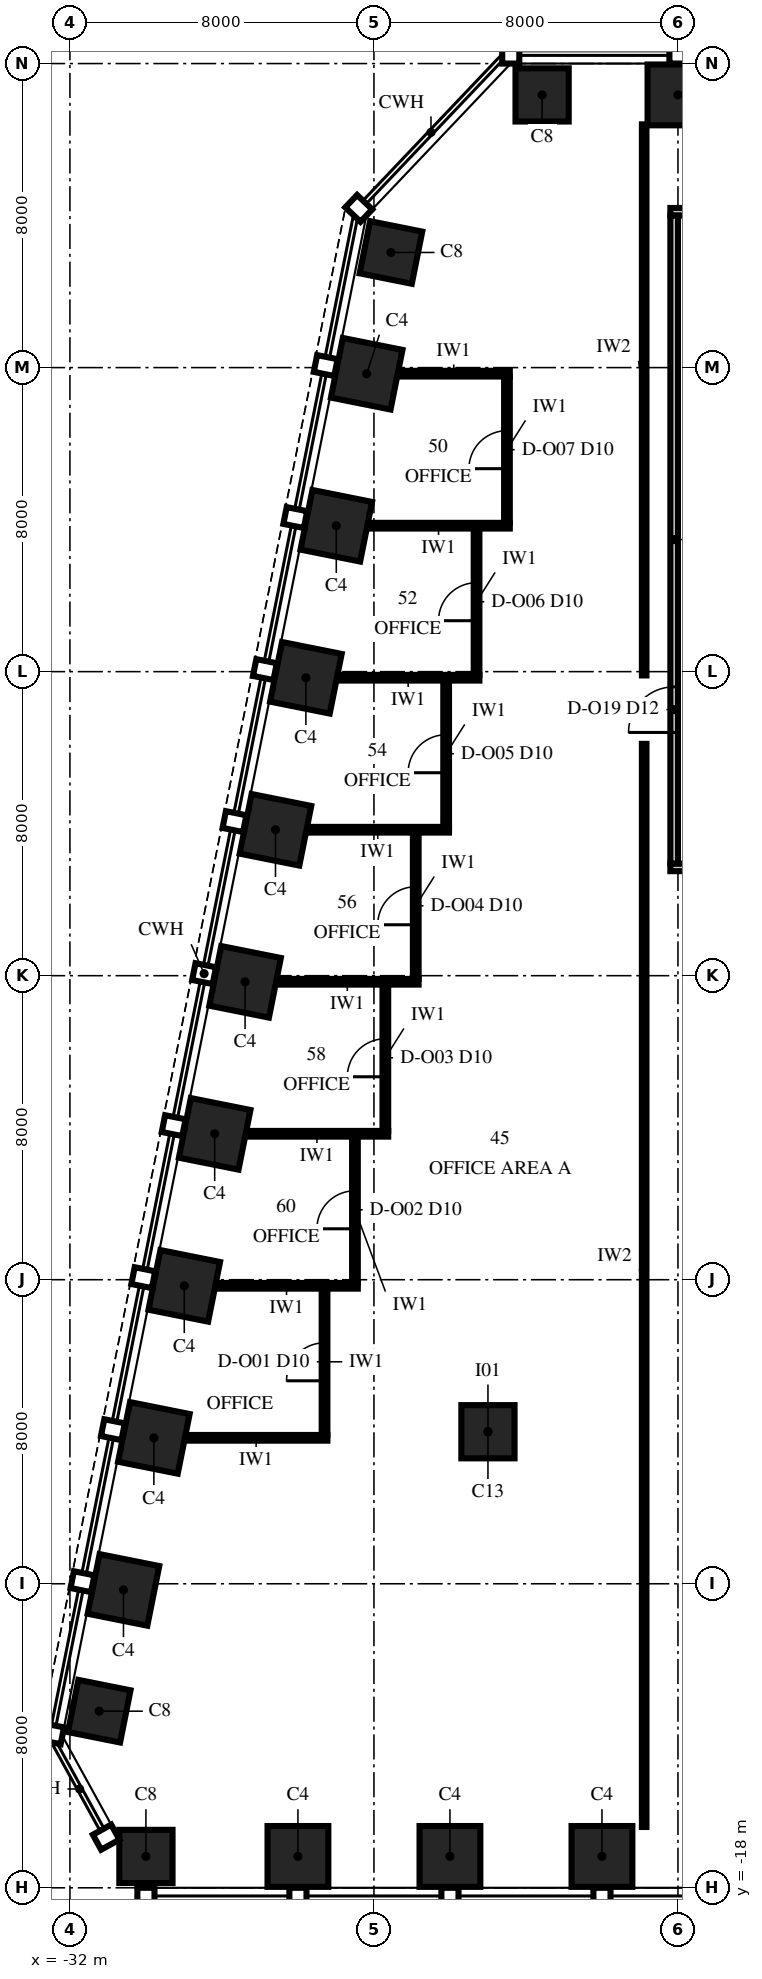
"""IFC4 building model, lengths in metres.
Left out: names, types, materials, properties, quantities, classifications, styles, units other than length and angle.
Written with IfcOpenShell. Run it as: python <this file> out.ifc"""

import sys

from ifc_helpers import new_model, si_unit, direction, frame, frame_2d, origin, origin_2d, place, context, subcontext, project, spatial, rectangle, extrude, element, fill, save


model = new_model("IFC4")
c1 = context("Model", 3, precision=1e-05, world=origin(), true_north=direction((0.0, 1.0)))
c2 = subcontext(c1, "Body", "Model", "MODEL_VIEW")
j1 = project(units=[si_unit("LENGTHUNIT", "METRE"), si_unit("PLANEANGLEUNIT", "RADIAN")], contexts=[c1])
p1 = place(None, origin())
s1 = spatial("IfcSite", under=j1, at=p1, CompositionType="ELEMENT")
p2 = place(p1, origin())
s2 = spatial("IfcBuilding", under=s1, at=p2, CompositionType="ELEMENT")
p3 = place(p2, frame((0.0, 0.0, 190.0)))
s3 = spatial("IfcBuildingStorey", under=s2, at=p3, CompositionType="ELEMENT", Elevation=190.0)
p4 = place(p3, frame((-30.0, -17.175, 0.0), z_axis=(0.0, 0.0, 1.0), x_axis=(1.0, 0.0, 0.0)))
e1 = element("IfcColumn", 1, at=p4, inside=s3, PredefinedType="COLUMN", context=c2, shape_type="SweptSolid", body=[
    extrude(rectangle(XDim=1.4, YDim=1.4, at=origin_2d()), origin(), (0.0, 0.0, 1.0), 4.0),
])
for number, where, z_axis, x_axis in (
    (2, (-26.0, -17.175, 0.0), (0.0, 0.0, 1.0), (1.0, 0.0, 0.0)),
    (3, (-22.0, -17.175, 0.0), (0.0, 0.0, 1.0), (1.0, 0.0, 0.0)),
    (4, (-18.0, -17.175, 0.0), (0.0, 0.0, 1.0), (1.0, 0.0, 0.0)),
    (5, (-16.0, 29.175, 0.0), (0.0, 0.0, 1.0), (-1.0, 0.0, 0.0)),
):
    element("IfcColumn", number, at=place(p3, frame(where, z_axis=z_axis, x_axis=x_axis)), inside=s3, PredefinedType="COLUMN", context=c2, shape_type="SweptSolid", body=[
        extrude(rectangle(XDim=1.6, YDim=1.6, at=origin_2d()), origin(), (0.0, 0.0, 1.0), 4.0),
    ])
for number, where, z_axis, x_axis in (
    (6, (-19.575, 29.175, 0.0), (0.0, 0.0, 1.0), (-1.0, 0.0, 0.0)),
    (7, (-23.553, 25.029, 0.0), (0.0, 0.0, 1.0), (-0.196, -0.981, 0.0)),
):
    element("IfcColumn", number, at=place(p3, frame(where, z_axis=z_axis, x_axis=x_axis)), inside=s3, PredefinedType="COLUMN", context=c2, shape_type="SweptSolid", body=[
        extrude(rectangle(XDim=1.4, YDim=1.4, at=origin_2d()), origin(), (0.0, 0.0, 1.0), 4.0),
    ])
for number, where, z_axis, x_axis in (
    (8, (-24.191, 21.838, 0.0), (0.0, 0.0, 1.0), (-0.196, -0.981, 0.0)),
    (9, (-24.991, 17.838, 0.0), (0.0, 0.0, 1.0), (-0.196, -0.981, 0.0)),
    (10, (-25.791, 13.838, 0.0), (0.0, 0.0, 1.0), (-0.196, -0.981, 0.0)),
    (11, (-26.591, 9.838, 0.0), (0.0, 0.0, 1.0), (-0.196, -0.981, 0.0)),
    (12, (-27.391, 5.838, 0.0), (0.0, 0.0, 1.0), (-0.196, -0.981, 0.0)),
    (13, (-28.191, 1.838, 0.0), (0.0, 0.0, 1.0), (-0.196, -0.981, 0.0)),
    (14, (-28.991, -2.162, 0.0), (0.0, 0.0, 1.0), (-0.196, -0.981, 0.0)),
    (15, (-29.791, -6.162, 0.0), (0.0, 0.0, 1.0), (-0.196, -0.981, 0.0)),
    (16, (-30.591, -10.162, 0.0), (0.0, 0.0, 1.0), (-0.196, -0.981, 0.0)),
):
    element("IfcColumn", number, at=place(p3, frame(where, z_axis=z_axis, x_axis=x_axis)), inside=s3, PredefinedType="COLUMN", context=c2, shape_type="SweptSolid", body=[
        extrude(rectangle(XDim=1.6, YDim=1.6, at=origin_2d()), origin(), (0.0, 0.0, 1.0), 4.0),
    ])
for number, where, z_axis, x_axis in (
    (17, (-31.229, -13.353, 0.0), (0.0, 0.0, 1.0), (-0.196, -0.981, 0.0)),
    (18, (-21.0, -6.0, 0.0), (0.0, 0.0, 1.0), (1.0, 0.0, 0.0)),
):
    element("IfcColumn", number, at=place(p3, frame(where, z_axis=z_axis, x_axis=x_axis)), inside=s3, PredefinedType="COLUMN", context=c2, shape_type="SweptSolid", body=[
        extrude(rectangle(XDim=1.4, YDim=1.4, at=origin_2d()), origin(), (0.0, 0.0, 1.0), 4.0),
    ])
p5 = place(p3, frame((-28.975, -6.16, 0.0), z_axis=(0.0, 0.0, 1.0), x_axis=(1.0, 0.0, 0.0)))
e19 = element("IfcWall", 19, at=p5, inside=s3, PredefinedType="PARTITIONING", context=c2, shape_type="SweptSolid", body=[
    extrude(rectangle(XDim=3.75, YDim=0.15, at=frame_2d((1.875, 0.0))), origin(), (0.0, 0.0, 1.0), 2.842),
])
for number, where, z_axis, x_axis in (
    (20, (-28.175, -2.16, 0.0), (0.0, 0.0, 1.0), (1.0, 0.0, 0.0)),
    (21, (-27.375, 1.84, 0.0), (0.0, 0.0, 1.0), (1.0, 0.0, 0.0)),
):
    element("IfcWall", number, at=place(p3, frame(where, z_axis=z_axis, x_axis=x_axis)), inside=s3, PredefinedType="PARTITIONING", context=c2, shape_type="SweptSolid", body=[
        extrude(rectangle(XDim=3.75, YDim=0.15, at=frame_2d((1.875, 0.0))), origin(), (0.0, 0.0, 1.0), 3.25),
    ])
p6 = place(p3, frame((-26.575, 5.84, 0.0), z_axis=(0.0, 0.0, 1.0), x_axis=(1.0, 0.0, 0.0)))
e22 = element("IfcWall", 22, at=p6, inside=s3, PredefinedType="PARTITIONING", context=c2, shape_type="SweptSolid", body=[
    extrude(rectangle(XDim=3.75, YDim=0.15, at=frame_2d((1.875, 0.0))), origin(), (0.0, 0.0, 1.0), 2.842),
])
p7 = place(p3, frame((-16.2, 8.85, 0.0), z_axis=(0.0, 0.0, 1.0), x_axis=(1.0, 0.0, 0.0)))
e23 = element("IfcWall", 23, at=p7, inside=s3, PredefinedType="PARTITIONING", context=c2, shape_type="SweptSolid", body=[
    extrude(rectangle(XDim=2.02, YDim=0.2, at=frame_2d((1.01, 0.0))), origin(), (0.0, 0.0, 1.0), 3.85),
])
p8 = place(p3, frame((-25.775, 9.84, 0.0), z_axis=(0.0, 0.0, 1.0), x_axis=(1.0, 0.0, 0.0)))
e24 = element("IfcWall", 24, at=p8, inside=s3, PredefinedType="PARTITIONING", context=c2, shape_type="SweptSolid", body=[
    extrude(rectangle(XDim=3.75, YDim=0.15, at=frame_2d((1.875, 0.0))), origin(), (0.0, 0.0, 1.0), 3.25),
])
for number, where, z_axis, x_axis in (
    (25, (-24.975, 13.84, 0.0), (0.0, 0.0, 1.0), (1.0, 0.0, 0.0)),
    (26, (-24.175, 17.84, 0.0), (0.0, 0.0, 1.0), (1.0, 0.0, 0.0)),
):
    element("IfcWall", number, at=place(p3, frame(where, z_axis=z_axis, x_axis=x_axis)), inside=s3, PredefinedType="PARTITIONING", context=c2, shape_type="SweptSolid", body=[
        extrude(rectangle(XDim=3.75, YDim=0.15, at=frame_2d((1.875, 0.0))), origin(), (0.0, 0.0, 1.0), 3.25),
    ])
p9 = place(p3, frame((-23.375, 21.84, 0.0), z_axis=(0.0, 0.0, 1.0), x_axis=(1.0, 0.0, 0.0)))
e27 = element("IfcWall", 27, at=p9, inside=s3, PredefinedType="PARTITIONING", context=c2, shape_type="SweptSolid", body=[
    extrude(rectangle(XDim=2.95, YDim=0.15, at=frame_2d((1.475, 0.0))), origin(), (0.0, 0.0, 1.0), 3.25),
])
p10 = place(p3, frame((-16.2, 26.1, 0.0), z_axis=(0.0, 0.0, 1.0), x_axis=(1.0, 0.0, 0.0)))
e28 = element("IfcWall", 28, at=p10, inside=s3, PredefinedType="PARTITIONING", context=c2, shape_type="SweptSolid", body=[
    extrude(rectangle(XDim=32.4, YDim=0.2, at=frame_2d((16.2, 0.0))), origin(), (0.0, 0.0, 1.0), 3.4),
])
p11 = place(p3, frame((-25.3, -6.085, 0.0), z_axis=(0.0, 0.0, 1.0), x_axis=(0.0, 1.0, 0.0)))
e29 = element("IfcWall", 29, at=p11, inside=s3, PredefinedType="PARTITIONING", context=c2, shape_type="SweptSolid", body=[
    extrude(rectangle(XDim=3.85, YDim=0.15, at=frame_2d((1.925, 0.0))), origin(), (0.0, 0.0, 1.0), 2.842),
])
p12 = place(p11, frame((1.425, 0.0, 0.0)))
e30 = element("IfcOpeningElement", 30, at=p12, cuts=e29, PredefinedType="OPENING", context=c2, shape_type="SweptSolid", body=[
    extrude(rectangle(XDim=1.0, YDim=2.3, at=frame_2d((0.5, 1.15))), frame((0.0, 0.09, 0.0), z_axis=(0.0, -1.0, 0.0), x_axis=(1.0, 0.0, 0.0)), (0.0, 0.0, 1.0), 0.18),
])
p13 = place(p3, frame((-24.5, -2.085, 0.0), z_axis=(0.0, 0.0, 1.0), x_axis=(0.0, 1.0, 0.0)))
e31 = element("IfcWall", 31, at=p13, inside=s3, PredefinedType="PARTITIONING", context=c2, shape_type="SweptSolid", body=[
    extrude(rectangle(XDim=3.85, YDim=0.15, at=frame_2d((1.925, 0.0))), origin(), (0.0, 0.0, 1.0), 3.85),
])
p14 = place(p13, frame((1.425, 0.0, 0.0)))
e32 = element("IfcOpeningElement", 32, at=p14, cuts=e31, PredefinedType="OPENING", context=c2, shape_type="SweptSolid", body=[
    extrude(rectangle(XDim=1.0, YDim=2.3, at=frame_2d((0.5, 1.15))), frame((0.0, 0.09, 0.0), z_axis=(0.0, -1.0, 0.0), x_axis=(1.0, 0.0, 0.0)), (0.0, 0.0, 1.0), 0.18),
])
p15 = place(p3, frame((-23.7, 1.915, 0.0), z_axis=(0.0, 0.0, 1.0), x_axis=(0.0, 1.0, 0.0)))
e33 = element("IfcWall", 33, at=p15, inside=s3, PredefinedType="PARTITIONING", context=c2, shape_type="SweptSolid", body=[
    extrude(rectangle(XDim=3.85, YDim=0.15, at=frame_2d((1.925, 0.0))), origin(), (0.0, 0.0, 1.0), 3.85),
])
p16 = place(p15, frame((1.425, 0.0, 0.0)))
e34 = element("IfcOpeningElement", 34, at=p16, cuts=e33, PredefinedType="OPENING", context=c2, shape_type="SweptSolid", body=[
    extrude(rectangle(XDim=1.0, YDim=2.3, at=frame_2d((0.5, 1.15))), frame((0.0, 0.09, 0.0), z_axis=(0.0, -1.0, 0.0), x_axis=(1.0, 0.0, 0.0)), (0.0, 0.0, 1.0), 0.18),
])
p17 = place(p3, frame((-22.9, 5.915, 0.0), z_axis=(0.0, 0.0, 1.0), x_axis=(0.0, 1.0, 0.0)))
e35 = element("IfcWall", 35, at=p17, inside=s3, PredefinedType="PARTITIONING", context=c2, shape_type="SweptSolid", body=[
    extrude(rectangle(XDim=3.85, YDim=0.15, at=frame_2d((1.925, 0.0))), origin(), (0.0, 0.0, 1.0), 2.842),
])
p18 = place(p17, frame((1.425, 0.0, 0.0)))
e36 = element("IfcOpeningElement", 36, at=p18, cuts=e35, PredefinedType="OPENING", context=c2, shape_type="SweptSolid", body=[
    extrude(rectangle(XDim=1.0, YDim=2.3, at=frame_2d((0.5, 1.15))), frame((0.0, 0.09, 0.0), z_axis=(0.0, -1.0, 0.0), x_axis=(1.0, 0.0, 0.0)), (0.0, 0.0, 1.0), 0.18),
])
p19 = place(p3, frame((-22.1, 9.915, 0.0), z_axis=(0.0, 0.0, 1.0), x_axis=(0.0, 1.0, 0.0)))
e37 = element("IfcWall", 37, at=p19, inside=s3, PredefinedType="PARTITIONING", context=c2, shape_type="SweptSolid", body=[
    extrude(rectangle(XDim=3.85, YDim=0.15, at=frame_2d((1.925, 0.0))), origin(), (0.0, 0.0, 1.0), 3.85),
])
p20 = place(p19, frame((1.425, 0.0, 0.0)))
e38 = element("IfcOpeningElement", 38, at=p20, cuts=e37, PredefinedType="OPENING", context=c2, shape_type="SweptSolid", body=[
    extrude(rectangle(XDim=1.0, YDim=2.3, at=frame_2d((0.5, 1.15))), frame((0.0, 0.09, 0.0), z_axis=(0.0, -1.0, 0.0), x_axis=(1.0, 0.0, 0.0)), (0.0, 0.0, 1.0), 0.18),
])
p21 = place(p3, frame((-21.3, 13.915, 0.0), z_axis=(0.0, 0.0, 1.0), x_axis=(0.0, 1.0, 0.0)))
e39 = element("IfcWall", 39, at=p21, inside=s3, PredefinedType="PARTITIONING", context=c2, shape_type="SweptSolid", body=[
    extrude(rectangle(XDim=3.85, YDim=0.15, at=frame_2d((1.925, 0.0))), origin(), (0.0, 0.0, 1.0), 3.25),
])
p22 = place(p21, frame((1.425, 0.0, 0.0)))
e40 = element("IfcOpeningElement", 40, at=p22, cuts=e39, PredefinedType="OPENING", context=c2, shape_type="SweptSolid", body=[
    extrude(rectangle(XDim=1.0, YDim=2.3, at=frame_2d((0.5, 1.15))), frame((0.0, 0.09, 0.0), z_axis=(0.0, -1.0, 0.0), x_axis=(1.0, 0.0, 0.0)), (0.0, 0.0, 1.0), 0.18),
])
p23 = place(p3, frame((-20.5, 17.915, 0.0), z_axis=(0.0, 0.0, 1.0), x_axis=(0.0, 1.0, 0.0)))
e41 = element("IfcWall", 41, at=p23, inside=s3, PredefinedType="PARTITIONING", context=c2, shape_type="SweptSolid", body=[
    extrude(rectangle(XDim=3.85, YDim=0.15, at=frame_2d((1.925, 0.0))), origin(), (0.0, 0.0, 1.0), 3.25),
])
p24 = place(p23, frame((1.425, 0.0, 0.0)))
e42 = element("IfcOpeningElement", 42, at=p24, cuts=e41, PredefinedType="OPENING", context=c2, shape_type="SweptSolid", body=[
    extrude(rectangle(XDim=1.0, YDim=2.3, at=frame_2d((0.5, 1.15))), frame((0.0, 0.09, 0.0), z_axis=(0.0, -1.0, 0.0), x_axis=(1.0, 0.0, 0.0)), (0.0, 0.0, 1.0), 0.18),
])
p25 = place(p3, frame((-16.1, 8.95, 0.0), z_axis=(0.0, 0.0, 1.0), x_axis=(0.0, 1.0, 0.0)))
e43 = element("IfcWall", 43, at=p25, inside=s3, PredefinedType="PARTITIONING", context=c2, shape_type="SweptSolid", body=[
    extrude(rectangle(XDim=17.05, YDim=0.2, at=frame_2d((8.525, 0.0))), origin(), (0.0, 0.0, 1.0), 3.25),
])
p26 = place(p25, frame((3.45, 0.0, 0.0)))
e44 = element("IfcOpeningElement", 44, at=p26, cuts=e43, PredefinedType="OPENING", context=c2, shape_type="SweptSolid", body=[
    extrude(rectangle(XDim=1.2, YDim=2.4, at=frame_2d((0.6, 1.2))), frame((0.0, 0.115, 0.0), z_axis=(0.0, -1.0, 0.0), x_axis=(1.0, 0.0, 0.0)), (0.0, 0.0, 1.0), 0.23),
])
p27 = place(p3, frame((-16.889, -16.4, 0.0), z_axis=(0.0, 0.0, 1.0), x_axis=(0.0, 1.0, 0.0)))
e45 = element("IfcWall", 45, at=p27, inside=s3, PredefinedType="PARTITIONING", context=c2, shape_type="SweptSolid", body=[
    extrude(rectangle(XDim=28.5, YDim=0.12, at=frame_2d((14.25, 0.0))), origin(), (0.0, 0.0, 1.0), 2.842),
])
p28 = place(p3, frame((-16.889, 13.9, 0.0), z_axis=(0.0, 0.0, 1.0), x_axis=(0.0, 1.0, 0.0)))
e46 = element("IfcWall", 46, at=p28, inside=s3, PredefinedType="PARTITIONING", context=c2, shape_type="SweptSolid", body=[
    extrude(rectangle(XDim=14.5, YDim=0.12, at=frame_2d((7.25, 0.0))), origin(), (0.0, 0.0, 1.0), 3.25),
])
p29 = place(p12, origin())
e47 = element("IfcDoor", 47, at=p29, inside=s3, OperationType="SINGLE_SWING_LEFT", PredefinedType="DOOR", context=c2, shape_type="SweptSolid", body=[
    extrude(rectangle(XDim=1.0, YDim=2.3, at=frame_2d((0.5, 1.15))), frame((0.0, 0.075, 0.0), z_axis=(0.0, -1.0, 0.0), x_axis=(1.0, 0.0, 0.0)), (0.0, 0.0, 1.0), 0.149),
])
fill(e30, e47)
p30 = place(p14, origin())
e48 = element("IfcDoor", 48, at=p30, inside=s3, OperationType="SINGLE_SWING_LEFT", PredefinedType="DOOR", context=c2, shape_type="SweptSolid", body=[
    extrude(rectangle(XDim=1.0, YDim=2.3, at=frame_2d((0.5, 1.15))), frame((0.0, 0.075, 0.0), z_axis=(0.0, -1.0, 0.0), x_axis=(1.0, 0.0, 0.0)), (0.0, 0.0, 1.0), 0.149),
])
fill(e32, e48)
p31 = place(p16, origin())
e49 = element("IfcDoor", 49, at=p31, inside=s3, OperationType="SINGLE_SWING_LEFT", PredefinedType="DOOR", context=c2, shape_type="SweptSolid", body=[
    extrude(rectangle(XDim=1.0, YDim=2.3, at=frame_2d((0.5, 1.15))), frame((0.0, 0.075, 0.0), z_axis=(0.0, -1.0, 0.0), x_axis=(1.0, 0.0, 0.0)), (0.0, 0.0, 1.0), 0.149),
])
fill(e34, e49)
p32 = place(p18, origin())
e50 = element("IfcDoor", 50, at=p32, inside=s3, OperationType="SINGLE_SWING_LEFT", PredefinedType="DOOR", context=c2, shape_type="SweptSolid", body=[
    extrude(rectangle(XDim=1.0, YDim=2.3, at=frame_2d((0.5, 1.15))), frame((0.0, 0.075, 0.0), z_axis=(0.0, -1.0, 0.0), x_axis=(1.0, 0.0, 0.0)), (0.0, 0.0, 1.0), 0.149),
])
fill(e36, e50)
p33 = place(p20, origin())
e51 = element("IfcDoor", 51, at=p33, inside=s3, OperationType="SINGLE_SWING_LEFT", PredefinedType="DOOR", context=c2, shape_type="SweptSolid", body=[
    extrude(rectangle(XDim=1.0, YDim=2.3, at=frame_2d((0.5, 1.15))), frame((0.0, 0.075, 0.0), z_axis=(0.0, -1.0, 0.0), x_axis=(1.0, 0.0, 0.0)), (0.0, 0.0, 1.0), 0.149),
])
fill(e38, e51)
p34 = place(p22, origin())
e52 = element("IfcDoor", 52, at=p34, inside=s3, OperationType="SINGLE_SWING_LEFT", PredefinedType="DOOR", context=c2, shape_type="SweptSolid", body=[
    extrude(rectangle(XDim=1.0, YDim=2.3, at=frame_2d((0.5, 1.15))), frame((0.0, 0.075, 0.0), z_axis=(0.0, -1.0, 0.0), x_axis=(1.0, 0.0, 0.0)), (0.0, 0.0, 1.0), 0.149),
])
fill(e40, e52)
p35 = place(p24, origin())
e53 = element("IfcDoor", 53, at=p35, inside=s3, OperationType="SINGLE_SWING_LEFT", PredefinedType="DOOR", context=c2, shape_type="SweptSolid", body=[
    extrude(rectangle(XDim=1.0, YDim=2.3, at=frame_2d((0.5, 1.15))), frame((0.0, 0.075, 0.0), z_axis=(0.0, -1.0, 0.0), x_axis=(1.0, 0.0, 0.0)), (0.0, 0.0, 1.0), 0.149),
])
fill(e42, e53)
p36 = place(p26, origin())
e54 = element("IfcDoor", 54, at=p36, inside=s3, OperationType="SINGLE_SWING_LEFT", PredefinedType="DOOR", context=c2, shape_type="SweptSolid", body=[
    extrude(rectangle(XDim=1.2, YDim=2.4, at=frame_2d((0.6, 1.2))), frame((0.0, 0.1, 0.0), z_axis=(0.0, -1.0, 0.0), x_axis=(1.0, 0.0, 0.0)), (0.0, 0.0, 1.0), 0.199),
])
fill(e44, e54)
save(model, sys.argv[1])
